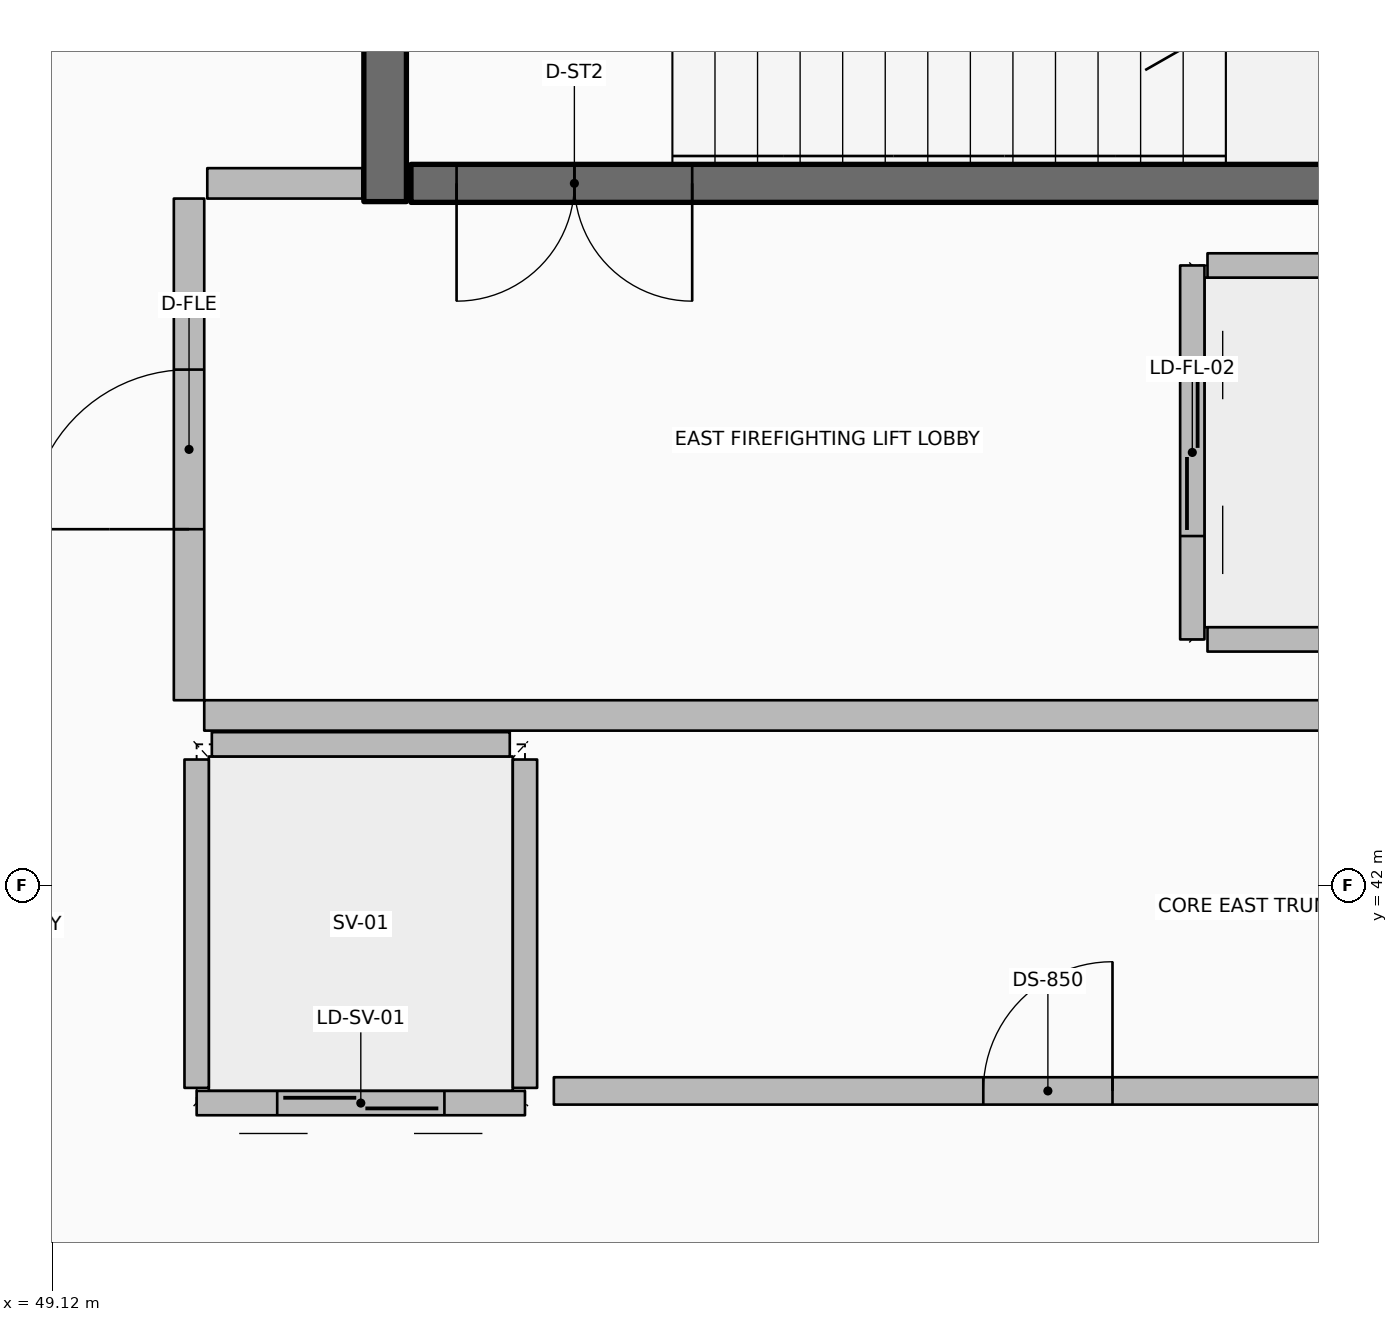
"""IFC4 building model, lengths in metres.
Left out: names, types, materials, properties, quantities, classifications, styles, units other than length and angle.
Written with IfcOpenShell. Run it as: python <this file> out.ifc"""

import sys

from ifc_helpers import new_model, si_unit, direction, frame, frame_2d, origin, origin_2d, place, context, subcontext, project, spatial, rectangle, hollow_rectangle, extrude, element, fill, save


model = new_model("IFC4")
c1 = context("Model", 3, precision=1e-05, world=origin(), true_north=direction((0.0, 1.0)))
c2 = subcontext(c1, "Body", "Model", "MODEL_VIEW")
j1 = project(units=[si_unit("LENGTHUNIT", "METRE"), si_unit("PLANEANGLEUNIT", "RADIAN")], contexts=[c1])
p1 = place(None, origin())
s1 = spatial("IfcSite", under=j1, at=p1, CompositionType="ELEMENT")
p2 = place(p1, origin())
s2 = spatial("IfcBuilding", under=s1, at=p2, CompositionType="ELEMENT")
p3 = place(p2, frame((0.0, 0.0, 7.2)))
s3 = spatial("IfcBuildingStorey", under=s2, at=p3, CompositionType="ELEMENT", Elevation=7.2)
p4 = place(p3, frame((51.31, 46.5, 0.0), z_axis=(0.0, 0.0, 1.0), x_axis=(0.0, 1.0, 0.0)))
e1 = element("IfcWall", 1, at=p4, inside=s3, PredefinedType="SHEAR", context=c2, shape_type="SweptSolid", body=[
    extrude(rectangle(XDim=3.5, YDim=0.28, at=frame_2d((1.75, 0.0))), origin(), (0.0, 0.0, 1.0), 4.8),
])
p5 = place(p3, frame((56.84, 46.62, 0.0), z_axis=(0.0, 0.0, 1.0), x_axis=(1.0, 0.0, 0.0)))
e2 = element("IfcColumn", 2, at=p5, inside=s3, PredefinedType="COLUMN", context=c2, shape_type="SweptSolid", body=[
    extrude(hollow_rectangle(XDim=0.2, YDim=0.2, WallThickness=0.01, InnerFilletRadius=0.01, OuterFilletRadius=0.02, at=origin_2d()), origin(), (0.0, 0.0, 1.0), 2.195),
])
p6 = place(p3, frame((51.48, 46.62, 0.0), z_axis=(0.0, 0.0, 1.0), x_axis=(1.0, 0.0, 0.0)))
e3 = element("IfcWall", 3, at=p6, inside=s3, PredefinedType="SOLIDWALL", context=c2, shape_type="SweptSolid", body=[
    extrude(rectangle(XDim=7.54, YDim=0.25, at=frame_2d((3.77, 0.0))), origin(), (0.0, 0.0, 1.0), 4.48),
])
p7 = place(p6, frame((0.3, 0.0, 0.0)))
e4 = element("IfcOpeningElement", 4, at=p7, cuts=e3, PredefinedType="OPENING", context=c2, shape_type="SweptSolid", body=[
    extrude(rectangle(XDim=1.55, YDim=2.15, at=frame_2d((0.775, 1.075))), frame((0.0, 0.135, 0.0), z_axis=(0.0, -1.0, 0.0), x_axis=(1.0, 0.0, 0.0)), (0.0, 0.0, 1.0), 0.27),
])
p8 = place(p3, frame((56.62, 46.08, 0.0), z_axis=(0.0, 0.0, 1.0), x_axis=(0.0, -1.0, 0.0)))
e5 = element("IfcWall", 5, at=p8, inside=s3, PredefinedType="PARTITIONING", context=c2, shape_type="SweptSolid", body=[
    extrude(rectangle(XDim=2.46, YDim=0.16, at=frame_2d((1.23, 0.0))), origin(), (0.0, 0.0, 1.0), 4.48),
])
p9 = place(p8, frame((0.68, 0.0, 0.0)))
e6 = element("IfcOpeningElement", 6, at=p9, cuts=e5, PredefinedType="OPENING", context=c2, shape_type="SweptSolid", body=[
    extrude(rectangle(XDim=1.1, YDim=2.1, at=frame_2d((0.55, 1.05))), frame((0.0, 0.09, 0.0), z_axis=(0.0, -1.0, 0.0), x_axis=(1.0, 0.0, 0.0)), (0.0, 0.0, 1.0), 0.18),
])
for number, where, z_axis, x_axis in (
    (7, (56.72, 46.08, 0.0), (0.0, 0.0, 1.0), (1.0, 0.0, 0.0)),
    (8, (56.72, 43.62, 0.0), (0.0, 0.0, 1.0), (1.0, 0.0, 0.0)),
):
    element("IfcWall", number, at=place(p3, frame(where, z_axis=z_axis, x_axis=x_axis)), inside=s3, PredefinedType="PARTITIONING", context=c2, shape_type="SweptSolid", body=[
        extrude(rectangle(XDim=2.06, YDim=0.16, at=frame_2d((1.03, 0.0))), origin(), (0.0, 0.0, 1.0), 4.48),
    ])
p10 = place(p3, frame((52.23, 40.57, 0.0), z_axis=(0.0, 0.0, 1.0), x_axis=(-1.0, 0.0, 0.0)))
e9 = element("IfcWall", 9, at=p10, inside=s3, PredefinedType="PARTITIONING", context=c2, shape_type="SweptSolid", body=[
    extrude(rectangle(XDim=2.16, YDim=0.16, at=frame_2d((1.08, 0.0))), origin(), (0.0, 0.0, 1.0), 4.48),
])
p11 = place(p10, frame((0.53, 0.0, 0.0)))
e10 = element("IfcOpeningElement", 10, at=p11, cuts=e9, PredefinedType="OPENING", context=c2, shape_type="SweptSolid", body=[
    extrude(rectangle(XDim=1.1, YDim=2.1, at=frame_2d((0.55, 1.05))), frame((0.0, 0.09, 0.0), z_axis=(0.0, -1.0, 0.0), x_axis=(1.0, 0.0, 0.0)), (0.0, 0.0, 1.0), 0.18),
])
for number, where, z_axis, x_axis in (
    (11, (52.23, 40.67, 0.0), (0.0, 0.0, 1.0), (0.0, 1.0, 0.0)),
    (12, (50.07, 40.67, 0.0), (0.0, 0.0, 1.0), (0.0, 1.0, 0.0)),
):
    element("IfcWall", number, at=place(p3, frame(where, z_axis=z_axis, x_axis=x_axis)), inside=s3, PredefinedType="PARTITIONING", context=c2, shape_type="SweptSolid", body=[
        extrude(rectangle(XDim=2.16, YDim=0.16, at=frame_2d((1.08, 0.0))), origin(), (0.0, 0.0, 1.0), 4.48),
    ])
p12 = place(p3, frame((50.17, 42.93, 0.0), z_axis=(0.0, 0.0, 1.0), x_axis=(1.0, 0.0, 0.0)))
e13 = element("IfcWall", 13, at=p12, inside=s3, PredefinedType="PARTITIONING", context=c2, shape_type="SweptSolid", body=[
    extrude(rectangle(XDim=1.96, YDim=0.16, at=frame_2d((0.98, 0.0))), origin(), (0.0, 0.0, 1.0), 4.48),
])
p13 = place(p3, frame((52.42, 40.65, 0.0), z_axis=(0.0, 0.0, 1.0), x_axis=(1.0, 0.0, 0.0)))
e14 = element("IfcWall", 14, at=p13, inside=s3, PredefinedType="PARTITIONING", context=c2, shape_type="SweptSolid", body=[
    extrude(rectangle(XDim=6.5, YDim=0.18, at=frame_2d((3.25, 0.0))), origin(), (0.0, 0.0, 1.0), 4.48),
])
p14 = place(p13, frame((2.825, 0.0, 0.0)))
e15 = element("IfcOpeningElement", 15, at=p14, cuts=e14, PredefinedType="OPENING", context=c2, shape_type="SweptSolid", body=[
    extrude(rectangle(XDim=0.85, YDim=2.06, at=frame_2d((0.425, 1.03))), frame((0.0, 0.1, 0.0), z_axis=(0.0, -1.0, 0.0), x_axis=(1.0, 0.0, 0.0)), (0.0, 0.0, 1.0), 0.2),
])
p15 = place(p3, frame((50.12, 43.12, 0.0), z_axis=(0.0, 0.0, 1.0), x_axis=(1.0, 0.0, 0.0)))
e16 = element("IfcWall", 16, at=p15, inside=s3, PredefinedType="PARTITIONING", context=c2, shape_type="SweptSolid", body=[
    extrude(rectangle(XDim=8.88, YDim=0.2, at=frame_2d((4.44, 0.0))), origin(), (0.0, 0.0, 1.0), 4.48),
])
p16 = place(p3, frame((50.14, 46.62, 0.0), z_axis=(0.0, 0.0, 1.0), x_axis=(1.0, 0.0, 0.0)))
e17 = element("IfcWall", 17, at=p16, inside=s3, PredefinedType="PARTITIONING", context=c2, shape_type="SweptSolid", body=[
    extrude(rectangle(XDim=1.02, YDim=0.2, at=frame_2d((0.51, 0.0))), origin(), (0.0, 0.0, 1.0), 4.48),
])
p17 = place(p3, frame((50.02, 43.22, 0.0), z_axis=(0.0, 0.0, 1.0), x_axis=(0.0, 1.0, 0.0)))
e18 = element("IfcWall", 18, at=p17, inside=s3, PredefinedType="PARTITIONING", context=c2, shape_type="SweptSolid", body=[
    extrude(rectangle(XDim=3.3, YDim=0.2, at=frame_2d((1.65, 0.0))), origin(), (0.0, 0.0, 1.0), 4.48),
])
p18 = place(p17, frame((1.125, 0.0, 0.0)))
e19 = element("IfcOpeningElement", 19, at=p18, cuts=e18, PredefinedType="OPENING", context=c2, shape_type="SweptSolid", body=[
    extrude(rectangle(XDim=1.05, YDim=2.1, at=frame_2d((0.525, 1.05))), frame((0.0, 0.11, 0.0), z_axis=(0.0, -1.0, 0.0), x_axis=(1.0, 0.0, 0.0)), (0.0, 0.0, 1.0), 0.22),
])
p19 = place(p7, origin())
e20 = element("IfcDoor", 20, at=p19, inside=s3, OperationType="DOUBLE_DOOR_SINGLE_SWING", PredefinedType="DOOR", context=c2, shape_type="SweptSolid", body=[
    extrude(rectangle(XDim=1.55, YDim=2.15, at=frame_2d((0.775, 1.075))), frame((0.0, 0.025, 0.0), z_axis=(0.0, -1.0, 0.0), x_axis=(1.0, 0.0, 0.0)), (0.0, 0.0, 1.0), 0.05),
])
fill(e4, e20)
p20 = place(p9, origin())
e21 = element("IfcDoor", 21, at=p20, inside=s3, OperationType="DOUBLE_DOOR_SLIDING", PredefinedType="DOOR", context=c2, shape_type="SweptSolid", body=[
    extrude(rectangle(XDim=1.1, YDim=2.1, at=frame_2d((0.55, 1.05))), frame((0.0, 0.025, 0.0), z_axis=(0.0, -1.0, 0.0), x_axis=(1.0, 0.0, 0.0)), (0.0, 0.0, 1.0), 0.05),
])
fill(e6, e21)
p21 = place(p11, origin())
e22 = element("IfcDoor", 22, at=p21, inside=s3, OperationType="DOUBLE_DOOR_SLIDING", PredefinedType="DOOR", context=c2, shape_type="SweptSolid", body=[
    extrude(rectangle(XDim=1.1, YDim=2.1, at=frame_2d((0.55, 1.05))), frame((0.0, 0.025, 0.0), z_axis=(0.0, -1.0, 0.0), x_axis=(1.0, 0.0, 0.0)), (0.0, 0.0, 1.0), 0.05),
])
fill(e10, e22)
p22 = place(p14, origin())
e23 = element("IfcDoor", 23, at=p22, inside=s3, OperationType="SINGLE_SWING_RIGHT", PredefinedType="DOOR", context=c2, shape_type="SweptSolid", body=[
    extrude(rectangle(XDim=0.85, YDim=2.06, at=frame_2d((0.425, 1.03))), frame((0.0, 0.025, 0.0), z_axis=(0.0, -1.0, 0.0), x_axis=(1.0, 0.0, 0.0)), (0.0, 0.0, 1.0), 0.05),
])
fill(e15, e23)
p23 = place(p18, origin())
e24 = element("IfcDoor", 24, at=p23, inside=s3, OperationType="SINGLE_SWING_LEFT", PredefinedType="DOOR", context=c2, shape_type="SweptSolid", body=[
    extrude(rectangle(XDim=1.05, YDim=2.1, at=frame_2d((0.525, 1.05))), frame((0.0, 0.025, 0.0), z_axis=(0.0, -1.0, 0.0), x_axis=(1.0, 0.0, 0.0)), (0.0, 0.0, 1.0), 0.05),
])
fill(e19, e24)
save(model, sys.argv[1])
